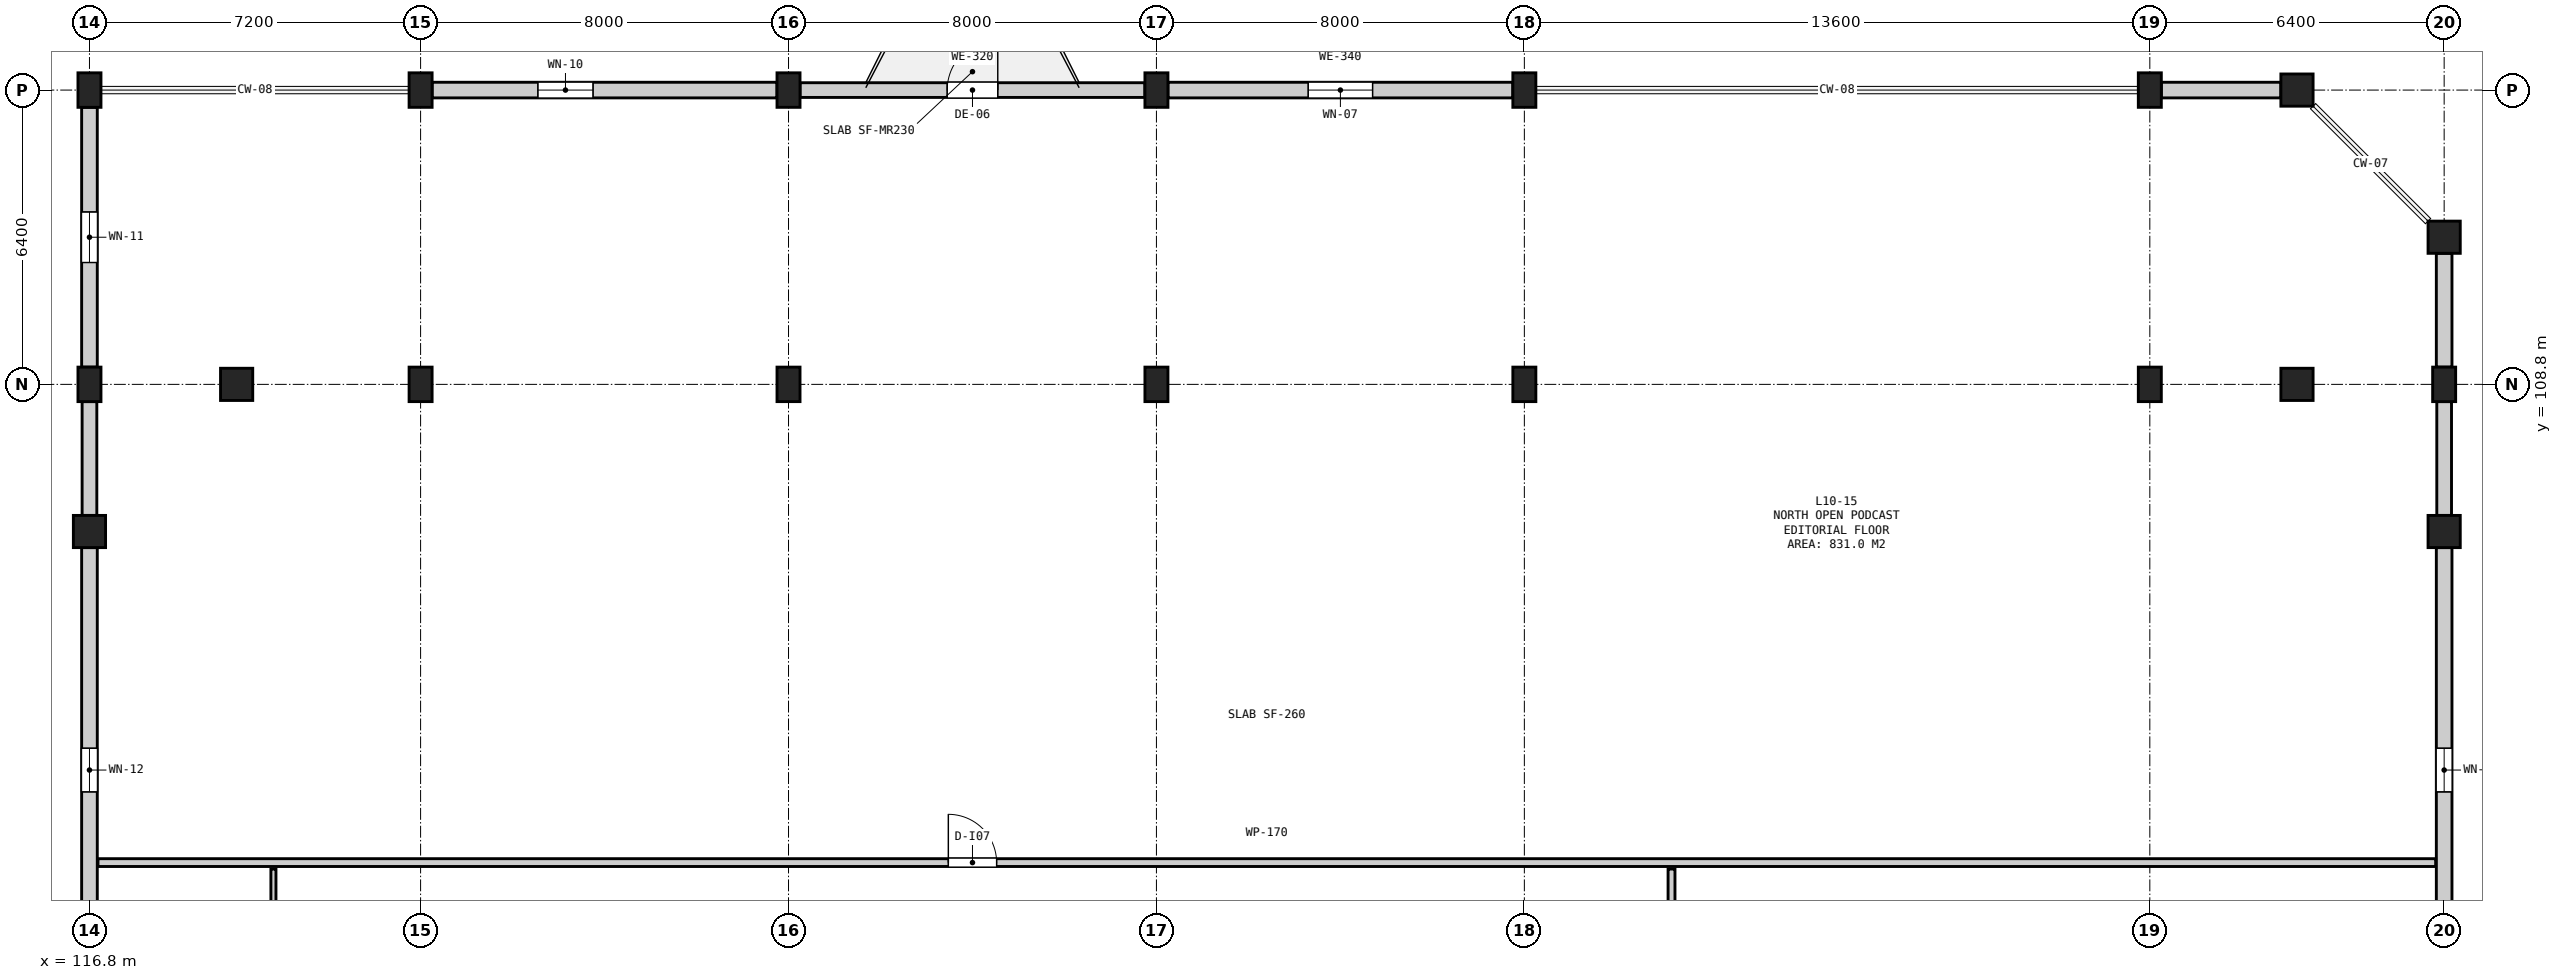
"""IFC4 building model, lengths in metres.
Left out: names, types, materials, properties, quantities, classifications, styles, units other than length and angle.
Written with IfcOpenShell. Run it as: python <this file> out.ifc"""

import sys

from ifc_helpers import new_model, si_unit, direction, frame, frame_2d, origin, origin_2d, place, context, subcontext, project, spatial, rectangle, circle, extrude, element, fill, save


model = new_model("IFC4")
c1 = context("Model", 3, precision=1e-05, world=origin(), true_north=direction((0.0, 1.0)))
c2 = subcontext(c1, "Body", "Model", "MODEL_VIEW")
j1 = project(units=[si_unit("LENGTHUNIT", "METRE"), si_unit("PLANEANGLEUNIT", "RADIAN")], contexts=[c1])
p1 = place(None, origin())
s1 = spatial("IfcSite", under=j1, at=p1, CompositionType="ELEMENT")
p2 = place(p1, origin())
s2 = spatial("IfcBuilding", under=s1, at=p2, CompositionType="ELEMENT")
p3 = place(p2, frame((0.0, 0.0, 43.3)))
s3 = spatial("IfcBuildingStorey", under=s2, at=p3, CompositionType="ELEMENT", Elevation=43.3)
p4 = place(p3, frame((116.8, 105.6, 0.0), z_axis=(0.0, 0.0, 1.0), x_axis=(1.0, 0.0, 0.0)))
e1 = element("IfcColumn", 1, at=p4, inside=s3, PredefinedType="COLUMN", context=c2, shape_type="SweptSolid", body=[
    extrude(circle(Radius=0.35, at=origin_2d()), origin(), (0.0, 0.0, 1.0), 3.8),
])
for number, where, z_axis, x_axis in (
    (2, (116.8, 108.8, 0.0), (0.0, 0.0, 1.0), (1.0, 0.0, 0.0)),
    (3, (116.8, 115.2, 0.0), (0.0, 0.0, 1.0), (1.0, 0.0, 0.0)),
):
    element("IfcColumn", number, at=place(p3, frame(where, z_axis=z_axis, x_axis=x_axis)), inside=s3, PredefinedType="COLUMN", context=c2, shape_type="SweptSolid", body=[
        extrude(rectangle(XDim=0.5, YDim=0.75, at=origin_2d()), origin(), (0.0, 0.0, 1.0), 3.8),
    ])
p5 = place(p3, frame((120.0, 108.8, 0.0), z_axis=(0.0, 0.0, 1.0), x_axis=(1.0, 0.0, 0.0)))
e4 = element("IfcColumn", 4, at=p5, inside=s3, PredefinedType="COLUMN", context=c2, shape_type="SweptSolid", body=[
    extrude(circle(Radius=0.35, at=origin_2d()), origin(), (0.0, 0.0, 1.0), 3.8),
])
for number, where, z_axis, x_axis in (
    (5, (124.0, 108.8, 0.0), (0.0, 0.0, 1.0), (1.0, 0.0, 0.0)),
    (6, (124.0, 115.2, 0.0), (0.0, 0.0, 1.0), (1.0, 0.0, 0.0)),
    (7, (132.0, 108.8, 0.0), (0.0, 0.0, 1.0), (1.0, 0.0, 0.0)),
    (8, (132.0, 115.2, 0.0), (0.0, 0.0, 1.0), (1.0, 0.0, 0.0)),
    (9, (140.0, 108.8, 0.0), (0.0, 0.0, 1.0), (1.0, 0.0, 0.0)),
    (10, (140.0, 115.2, 0.0), (0.0, 0.0, 1.0), (1.0, 0.0, 0.0)),
    (11, (148.0, 108.8, 0.0), (0.0, 0.0, 1.0), (1.0, 0.0, 0.0)),
    (12, (148.0, 115.2, 0.0), (0.0, 0.0, 1.0), (1.0, 0.0, 0.0)),
    (13, (161.6, 108.8, 0.0), (0.0, 0.0, 1.0), (1.0, 0.0, 0.0)),
    (14, (161.6, 115.2, 0.0), (0.0, 0.0, 1.0), (1.0, 0.0, 0.0)),
):
    element("IfcColumn", number, at=place(p3, frame(where, z_axis=z_axis, x_axis=x_axis)), inside=s3, PredefinedType="COLUMN", context=c2, shape_type="SweptSolid", body=[
        extrude(rectangle(XDim=0.5, YDim=0.75, at=origin_2d()), origin(), (0.0, 0.0, 1.0), 3.8),
    ])
for number, where, z_axis, x_axis in (
    (15, (164.8, 108.8, 0.0), (0.0, 0.0, 1.0), (1.0, 0.0, 0.0)),
    (16, (164.8, 115.2, 0.0), (0.0, 0.0, 1.0), (1.0, 0.0, 0.0)),
    (17, (168.0, 105.6, 0.0), (0.0, 0.0, 1.0), (1.0, 0.0, 0.0)),
):
    element("IfcColumn", number, at=place(p3, frame(where, z_axis=z_axis, x_axis=x_axis)), inside=s3, PredefinedType="COLUMN", context=c2, shape_type="SweptSolid", body=[
        extrude(circle(Radius=0.35, at=origin_2d()), origin(), (0.0, 0.0, 1.0), 3.8),
    ])
p6 = place(p3, frame((168.0, 108.8, 0.0), z_axis=(0.0, 0.0, 1.0), x_axis=(1.0, 0.0, 0.0)))
e18 = element("IfcColumn", 18, at=p6, inside=s3, PredefinedType="COLUMN", context=c2, shape_type="SweptSolid", body=[
    extrude(rectangle(XDim=0.5, YDim=0.75, at=origin_2d()), origin(), (0.0, 0.0, 1.0), 3.8),
])
p7 = place(p3, frame((168.0, 112.0, 0.0), z_axis=(0.0, 0.0, 1.0), x_axis=(1.0, 0.0, 0.0)))
e19 = element("IfcColumn", 19, at=p7, inside=s3, PredefinedType="COLUMN", context=c2, shape_type="SweptSolid", body=[
    extrude(circle(Radius=0.35, at=origin_2d()), origin(), (0.0, 0.0, 1.0), 3.8),
])
p8 = place(p3, frame((168.0, 95.575, 0.0), z_axis=(0.0, 0.0, 1.0), x_axis=(0.0, 1.0, 0.0)))
e20 = element("IfcWall", 20, at=p8, inside=s3, PredefinedType="SOLIDWALL", context=c2, shape_type="SweptSolid", body=[
    extrude(rectangle(XDim=9.675, YDim=0.34, at=frame_2d((4.837, 0.0))), origin(), (0.0, 0.0, 1.0), 2.485),
])
p9 = place(p8, frame((4.363, 0.0, 0.8)))
e21 = element("IfcOpeningElement", 21, at=p9, cuts=e20, PredefinedType="OPENING", context=c2, shape_type="SweptSolid", body=[
    extrude(rectangle(XDim=0.95, YDim=1.45, at=frame_2d((0.475, 0.725))), frame((0.0, 0.182, 0.0), z_axis=(0.0, -1.0, 0.0), x_axis=(1.0, 0.0, 0.0)), (0.0, 0.0, 1.0), 0.364),
])
p10 = place(p3, frame((168.0, 105.95, 0.0), z_axis=(0.0, 0.0, 1.0), x_axis=(0.0, 1.0, 0.0)))
e22 = element("IfcWall", 22, at=p10, inside=s3, PredefinedType="SOLIDWALL", context=c2, shape_type="SweptSolid", body=[
    extrude(rectangle(XDim=2.475, YDim=0.32, at=frame_2d((1.238, 0.0))), origin(), (0.0, 0.0, 1.0), 2.485),
])
p11 = place(p3, frame((168.0, 109.175, 0.0), z_axis=(0.0, 0.0, 1.0), x_axis=(0.0, 1.0, 0.0)))
e23 = element("IfcWall", 23, at=p11, inside=s3, PredefinedType="SOLIDWALL", context=c2, shape_type="SweptSolid", body=[
    extrude(rectangle(XDim=2.475, YDim=0.34, at=frame_2d((1.237, 0.0))), origin(), (0.0, 0.0, 1.0), 2.9),
])
p12 = place(p3, frame((164.45, 115.2, 0.0), z_axis=(0.0, 0.0, 1.0), x_axis=(-1.0, 0.0, 0.0)))
e24 = element("IfcWall", 24, at=p12, inside=s3, PredefinedType="SOLIDWALL", context=c2, shape_type="SweptSolid", body=[
    extrude(rectangle(XDim=2.6, YDim=0.34, at=frame_2d((1.3, 0.0))), origin(), (0.0, 0.0, 1.0), 2.9),
])
p13 = place(p3, frame((147.75, 115.2, 0.0), z_axis=(0.0, 0.0, 1.0), x_axis=(-1.0, 0.0, 0.0)))
e25 = element("IfcWall", 25, at=p13, inside=s3, PredefinedType="SOLIDWALL", context=c2, shape_type="SweptSolid", body=[
    extrude(rectangle(XDim=7.5, YDim=0.34, at=frame_2d((3.75, 0.0))), origin(), (0.0, 0.0, 1.0), 2.885),
])
p14 = place(p13, frame((3.05, 0.0, 0.9)))
e26 = element("IfcOpeningElement", 26, at=p14, cuts=e25, PredefinedType="OPENING", context=c2, shape_type="SweptSolid", body=[
    extrude(rectangle(XDim=1.4, YDim=1.8, at=frame_2d((0.7, 0.9))), frame((0.0, 0.182, 0.0), z_axis=(0.0, -1.0, 0.0), x_axis=(1.0, 0.0, 0.0)), (0.0, 0.0, 1.0), 0.364),
])
p15 = place(p3, frame((139.75, 115.2, 0.0), z_axis=(0.0, 0.0, 1.0), x_axis=(-1.0, 0.0, 0.0)))
e27 = element("IfcWall", 27, at=p15, inside=s3, PredefinedType="SOLIDWALL", context=c2, shape_type="SweptSolid", body=[
    extrude(rectangle(XDim=7.5, YDim=0.32, at=frame_2d((3.75, 0.0))), origin(), (0.0, 0.0, 1.0), 2.9),
])
p16 = place(p15, frame((3.2, 0.0, 0.0)))
e28 = element("IfcOpeningElement", 28, at=p16, cuts=e27, PredefinedType="OPENING", context=c2, shape_type="SweptSolid", body=[
    extrude(rectangle(XDim=1.1, YDim=2.2, at=frame_2d((0.55, 1.1))), frame((0.0, 0.172, 0.0), z_axis=(0.0, -1.0, 0.0), x_axis=(1.0, 0.0, 0.0)), (0.0, 0.0, 1.0), 0.344),
])
p17 = place(p3, frame((131.75, 115.2, 0.0), z_axis=(0.0, 0.0, 1.0), x_axis=(-1.0, 0.0, 0.0)))
e29 = element("IfcWall", 29, at=p17, inside=s3, PredefinedType="SOLIDWALL", context=c2, shape_type="SweptSolid", body=[
    extrude(rectangle(XDim=7.5, YDim=0.34, at=frame_2d((3.75, 0.0))), origin(), (0.0, 0.0, 1.0), 2.9),
])
p18 = place(p17, frame((4.0, 0.0, 0.9)))
e30 = element("IfcOpeningElement", 30, at=p18, cuts=e29, PredefinedType="OPENING", context=c2, shape_type="SweptSolid", body=[
    extrude(rectangle(XDim=1.2, YDim=1.7, at=frame_2d((0.6, 0.85))), frame((0.0, 0.182, 0.0), z_axis=(0.0, -1.0, 0.0), x_axis=(1.0, 0.0, 0.0)), (0.0, 0.0, 1.0), 0.364),
])
p19 = place(p3, frame((116.8, 114.825, 0.0), z_axis=(0.0, 0.0, 1.0), x_axis=(0.0, -1.0, 0.0)))
e31 = element("IfcWall", 31, at=p19, inside=s3, PredefinedType="SOLIDWALL", context=c2, shape_type="SweptSolid", body=[
    extrude(rectangle(XDim=5.65, YDim=0.34, at=frame_2d((2.825, 0.0))), origin(), (0.0, 0.0, 1.0), 2.9),
])
p20 = place(p19, frame((2.275, 0.0, 0.9)))
e32 = element("IfcOpeningElement", 32, at=p20, cuts=e31, PredefinedType="OPENING", context=c2, shape_type="SweptSolid", body=[
    extrude(rectangle(XDim=1.1, YDim=1.55, at=frame_2d((0.55, 0.775))), frame((0.0, 0.182, 0.0), z_axis=(0.0, -1.0, 0.0), x_axis=(1.0, 0.0, 0.0)), (0.0, 0.0, 1.0), 0.364),
])
p21 = place(p3, frame((116.8, 108.425, 0.0), z_axis=(0.0, 0.0, 1.0), x_axis=(0.0, -1.0, 0.0)))
e33 = element("IfcWall", 33, at=p21, inside=s3, PredefinedType="SOLIDWALL", context=c2, shape_type="SweptSolid", body=[
    extrude(rectangle(XDim=2.475, YDim=0.32, at=frame_2d((1.238, 0.0))), origin(), (0.0, 0.0, 1.0), 2.435),
])
p22 = place(p3, frame((116.8, 105.25, 0.0), z_axis=(0.0, 0.0, 1.0), x_axis=(0.0, -1.0, 0.0)))
e34 = element("IfcWall", 34, at=p22, inside=s3, PredefinedType="SOLIDWALL", context=c2, shape_type="SweptSolid", body=[
    extrude(rectangle(XDim=9.675, YDim=0.34, at=frame_2d((4.837, 0.0))), origin(), (0.0, 0.0, 1.0), 2.435),
])
p23 = place(p22, frame((4.363, 0.0, 0.8)))
e35 = element("IfcOpeningElement", 35, at=p23, cuts=e34, PredefinedType="OPENING", context=c2, shape_type="SweptSolid", body=[
    extrude(rectangle(XDim=0.95, YDim=1.45, at=frame_2d((0.475, 0.725))), frame((0.0, 0.182, 0.0), z_axis=(0.0, -1.0, 0.0), x_axis=(1.0, 0.0, 0.0)), (0.0, 0.0, 1.0), 0.364),
])
p24 = place(p3, frame((116.985, 98.4, 0.0), z_axis=(0.0, 0.0, 1.0), x_axis=(1.0, 0.0, 0.0)))
e36 = element("IfcWall", 36, at=p24, inside=s3, PredefinedType="PARTITIONING", context=c2, shape_type="SweptSolid", body=[
    extrude(rectangle(XDim=50.83, YDim=0.17, at=frame_2d((25.415, 0.0))), origin(), (0.0, 0.0, 1.0), 3.52),
])
p25 = place(p24, frame((18.49, 0.0, 0.0)))
e37 = element("IfcOpeningElement", 37, at=p25, cuts=e36, PredefinedType="OPENING", context=c2, shape_type="SweptSolid", body=[
    extrude(rectangle(XDim=1.05, YDim=2.15, at=frame_2d((0.525, 1.075))), frame((0.0, 0.097, 0.0), z_axis=(0.0, -1.0, 0.0), x_axis=(1.0, 0.0, 0.0)), (0.0, 0.0, 1.0), 0.194),
])
p26 = place(p3, frame((151.2, 87.34, 0.0), z_axis=(0.0, 0.0, 1.0), x_axis=(0.0, 1.0, 0.0)))
e38 = element("IfcWall", 38, at=p26, inside=s3, PredefinedType="PARTITIONING", context=c2, shape_type="SweptSolid", body=[
    extrude(rectangle(XDim=10.92, YDim=0.15, at=frame_2d((5.46, 0.0))), origin(), (0.0, 0.0, 1.0), 3.52),
])
p27 = place(p26, frame((4.935, 0.0, 0.0)))
e39 = element("IfcOpeningElement", 39, at=p27, cuts=e38, PredefinedType="OPENING", context=c2, shape_type="SweptSolid", body=[
    extrude(rectangle(XDim=1.05, YDim=2.15, at=frame_2d((0.525, 1.075))), frame((0.0, 0.087, 0.0), z_axis=(0.0, -1.0, 0.0), x_axis=(1.0, 0.0, 0.0)), (0.0, 0.0, 1.0), 0.174),
])
p28 = place(p3, frame((120.8, 76.14, 0.0), z_axis=(0.0, 0.0, 1.0), x_axis=(0.0, 1.0, 0.0)))
e40 = element("IfcWall", 40, at=p28, inside=s3, PredefinedType="PARTITIONING", context=c2, shape_type="SweptSolid", body=[
    extrude(rectangle(XDim=22.12, YDim=0.11, at=frame_2d((11.06, 0.0))), origin(), (0.0, 0.0, 1.0), 3.52),
])
p29 = place(p28, frame((6.535, 0.0, 0.0)))
e41 = element("IfcOpeningElement", 41, at=p29, cuts=e40, PredefinedType="OPENING", context=c2, shape_type="SweptSolid", body=[
    extrude(rectangle(XDim=1.05, YDim=2.15, at=frame_2d((0.525, 1.075))), frame((0.0, 0.067, 0.0), z_axis=(0.0, -1.0, 0.0), x_axis=(1.0, 0.0, 0.0)), (0.0, 0.0, 1.0), 0.134),
])
p30 = place(p9, origin())
e42 = element("IfcWindow", 42, at=p30, inside=s3, PartitioningType="SINGLE_PANEL", PredefinedType="WINDOW", context=c2, shape_type="SweptSolid", body=[
    extrude(rectangle(XDim=0.95, YDim=1.45, at=frame_2d((0.475, 0.725))), frame((0.0, 0.03, 0.0), z_axis=(0.0, -1.0, 0.0), x_axis=(1.0, 0.0, 0.0)), (0.0, 0.0, 1.0), 0.06),
])
fill(e21, e42)
p31 = place(p14, origin())
e43 = element("IfcWindow", 43, at=p31, inside=s3, PartitioningType="SINGLE_PANEL", PredefinedType="WINDOW", context=c2, shape_type="SweptSolid", body=[
    extrude(rectangle(XDim=1.4, YDim=1.8, at=frame_2d((0.7, 0.9))), frame((0.0, 0.03, 0.0), z_axis=(0.0, -1.0, 0.0), x_axis=(1.0, 0.0, 0.0)), (0.0, 0.0, 1.0), 0.06),
])
fill(e26, e43)
p32 = place(p16, frame((1.1, 0.0, 0.0), z_axis=(0.0, 0.0, 1.0), x_axis=(-1.0, 0.0, 0.0)))
e44 = element("IfcDoor", 44, at=p32, inside=s3, OperationType="SINGLE_SWING_RIGHT", PredefinedType="DOOR", context=c2, shape_type="SweptSolid", body=[
    extrude(rectangle(XDim=1.1, YDim=2.2, at=frame_2d((0.55, 1.1))), frame((0.0, 0.025, 0.0), z_axis=(0.0, -1.0, 0.0), x_axis=(1.0, 0.0, 0.0)), (0.0, 0.0, 1.0), 0.05),
])
fill(e28, e44)
p33 = place(p18, origin())
e45 = element("IfcWindow", 45, at=p33, inside=s3, PartitioningType="SINGLE_PANEL", PredefinedType="WINDOW", context=c2, shape_type="SweptSolid", body=[
    extrude(rectangle(XDim=1.2, YDim=1.7, at=frame_2d((0.6, 0.85))), frame((0.0, 0.03, 0.0), z_axis=(0.0, -1.0, 0.0), x_axis=(1.0, 0.0, 0.0)), (0.0, 0.0, 1.0), 0.06),
])
fill(e30, e45)
p34 = place(p20, origin())
e46 = element("IfcWindow", 46, at=p34, inside=s3, PartitioningType="SINGLE_PANEL", PredefinedType="WINDOW", context=c2, shape_type="SweptSolid", body=[
    extrude(rectangle(XDim=1.1, YDim=1.55, at=frame_2d((0.55, 0.775))), frame((0.0, 0.03, 0.0), z_axis=(0.0, -1.0, 0.0), x_axis=(1.0, 0.0, 0.0)), (0.0, 0.0, 1.0), 0.06),
])
fill(e32, e46)
p35 = place(p23, origin())
e47 = element("IfcWindow", 47, at=p35, inside=s3, PartitioningType="SINGLE_PANEL", PredefinedType="WINDOW", context=c2, shape_type="SweptSolid", body=[
    extrude(rectangle(XDim=0.95, YDim=1.45, at=frame_2d((0.475, 0.725))), frame((0.0, 0.03, 0.0), z_axis=(0.0, -1.0, 0.0), x_axis=(1.0, 0.0, 0.0)), (0.0, 0.0, 1.0), 0.06),
])
fill(e35, e47)
p36 = place(p25, origin())
e48 = element("IfcDoor", 48, at=p36, inside=s3, OperationType="SINGLE_SWING_LEFT", PredefinedType="DOOR", context=c2, shape_type="SweptSolid", body=[
    extrude(rectangle(XDim=1.05, YDim=2.15, at=frame_2d((0.525, 1.075))), frame((0.0, 0.025, 0.0), z_axis=(0.0, -1.0, 0.0), x_axis=(1.0, 0.0, 0.0)), (0.0, 0.0, 1.0), 0.05),
])
fill(e37, e48)
save(model, sys.argv[1])
